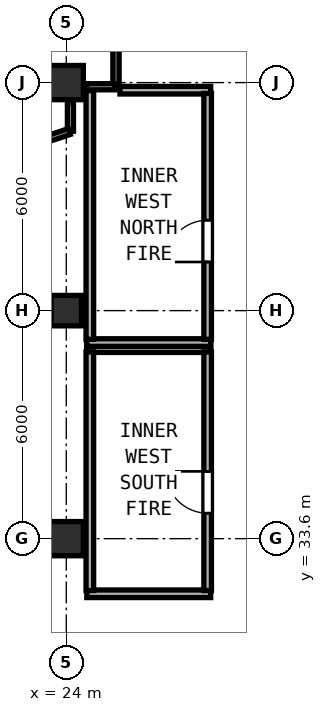
"""IFC4 building model, lengths in metres.
Left out: names, types, materials, properties, quantities, classifications, styles, units other than length and angle.
Written with IfcOpenShell. Run it as: python <this file> out.ifc"""

import sys

from ifc_helpers import new_model, si_unit, direction, frame, frame_2d, origin, origin_2d, place, context, subcontext, project, spatial, rectangle, hollow_rectangle, extrude, element, fill, save


model = new_model("IFC4")
c1 = context("Model", 3, precision=1e-05, world=origin(), true_north=direction((0.0, 1.0)))
c2 = subcontext(c1, "Body", "Model", "MODEL_VIEW")
j1 = project(units=[si_unit("LENGTHUNIT", "METRE"), si_unit("PLANEANGLEUNIT", "RADIAN")], contexts=[c1])
p1 = place(None, origin())
s1 = spatial("IfcSite", under=j1, at=p1, CompositionType="ELEMENT")
p2 = place(p1, origin())
s2 = spatial("IfcBuilding", under=s1, at=p2, CompositionType="ELEMENT")
p3 = place(p2, frame((0.0, 0.0, 207.0)))
s3 = spatial("IfcBuildingStorey", under=s2, at=p3, CompositionType="ELEMENT", Elevation=207.0)
for number, where, z_axis, x_axis in (
    (1, (24.0, 33.6, 0.0), (0.0, 0.0, 1.0), (1.0, 0.0, 0.0)),
    (2, (24.0, 45.6, 0.0), (0.0, 0.0, 1.0), (1.0, 0.0, 0.0)),
):
    element("IfcColumn", number, at=place(p3, frame(where, z_axis=z_axis, x_axis=x_axis)), inside=s3, PredefinedType="COLUMN", context=c2, shape_type="SweptSolid", body=[
        extrude(hollow_rectangle(XDim=0.9, YDim=0.9, WallThickness=0.034, at=origin_2d()), origin(), (0.0, 0.0, 1.0), 4.6),
    ])
p4 = place(p3, frame((24.0, 39.6, 0.0), z_axis=(0.0, 0.0, 1.0), x_axis=(1.0, 0.0, 0.0)))
e3 = element("IfcColumn", 3, at=p4, inside=s3, PredefinedType="COLUMN", context=c2, shape_type="SweptSolid", body=[
    extrude(hollow_rectangle(XDim=0.8, YDim=0.8, WallThickness=0.03, at=origin_2d()), origin(), (0.0, 0.0, 1.0), 4.6),
])
p5 = place(p3, frame((25.31, 46.66, 0.0), z_axis=(0.0, 0.0, 1.0), x_axis=(0.0, -1.0, 0.0)))
e4 = element("IfcWall", 4, at=p5, inside=s3, PredefinedType="PARAPET", context=c2, shape_type="SweptSolid", body=[
    extrude(rectangle(XDim=1.17, YDim=0.16, at=frame_2d((0.585, 0.0))), origin(), (0.0, 0.0, 1.0), 1.15),
])
p6 = place(p3, frame((25.28, 45.49, 0.0), z_axis=(0.0, 0.0, 1.0), x_axis=(-1.0, 0.0, 0.0)))
e5 = element("IfcWall", 5, at=p6, inside=s3, PredefinedType="PARAPET", context=c2, shape_type="SweptSolid", body=[
    extrude(rectangle(XDim=0.838, YDim=0.16, at=frame_2d((0.419, 0.0))), origin(), (0.0, 0.0, 1.0), 1.15),
])
p7 = place(p3, frame((24.11, 45.158, 0.0), z_axis=(0.0, 0.0, 1.0), x_axis=(0.0, -1.0, 0.0)))
e6 = element("IfcWall", 6, at=p7, inside=s3, PredefinedType="PARAPET", context=c2, shape_type="SweptSolid", body=[
    extrude(rectangle(XDim=0.837, YDim=0.16, at=frame_2d((0.418, 0.0))), origin(), (0.0, 0.0, 1.0), 1.15),
])
p8 = place(p3, frame((24.082, 44.311, 0.0), z_axis=(0.0, 0.0, 1.0), x_axis=(-0.948687320562, -0.316215698225, 0.0)))
e7 = element("IfcWall", 7, at=p8, inside=s3, PredefinedType="PARAPET", context=c2, shape_type="SweptSolid", body=[
    extrude(rectangle(XDim=6.069, YDim=0.16, at=frame_2d((3.035, 0.0))), origin(), (0.0, 0.0, 1.0), 1.15),
])
for number, where, z_axis, x_axis in (
    (8, (24.54, 38.6, 0.0), (0.0, 0.0, 1.0), (1.0, 0.0, 0.0)),
    (9, (24.54, 32.15, 0.0), (0.0, 0.0, 1.0), (1.0, 0.0, 0.0)),
):
    element("IfcWall", number, at=place(p3, frame(where, z_axis=z_axis, x_axis=x_axis)), inside=s3, PredefinedType="SOLIDWALL", context=c2, shape_type="SweptSolid", body=[
        extrude(rectangle(XDim=3.26, YDim=0.2, at=frame_2d((1.63, 0.0))), origin(), (0.0, 0.0, 1.0), 4.42),
    ])
p9 = place(p3, frame((24.62, 32.235, 0.0), z_axis=(0.0, 0.0, 1.0), x_axis=(0.0, 1.0, 0.0)))
e10 = element("IfcWall", 10, at=p9, inside=s3, PredefinedType="SOLIDWALL", context=c2, shape_type="SweptSolid", body=[
    extrude(rectangle(XDim=6.28, YDim=0.2, at=frame_2d((3.14, 0.0))), origin(), (0.0, 0.0, 1.0), 4.42),
])
p10 = place(p3, frame((27.72, 32.235, 0.0), z_axis=(0.0, 0.0, 1.0), x_axis=(0.0, 1.0, 0.0)))
e11 = element("IfcWall", 11, at=p10, inside=s3, PredefinedType="SOLIDWALL", context=c2, shape_type="SweptSolid", body=[
    extrude(rectangle(XDim=6.28, YDim=0.2, at=frame_2d((3.14, 0.0))), origin(), (0.0, 0.0, 1.0), 4.42),
])
p11 = place(p10, frame((3.135, 0.0, 0.0), z_axis=(0.0, 0.0, 1.0), x_axis=(-1.0, 0.0, 0.0)))
e12 = element("IfcOpeningElement", 12, at=p11, cuts=e11, PredefinedType="OPENING", context=c2, shape_type="SweptSolid", body=[
    extrude(rectangle(XDim=1.1, YDim=2.15, at=frame_2d((0.55, 1.075))), frame((0.0, 0.11, 0.0), z_axis=(0.0, -1.0, 0.0), x_axis=(1.0, 0.0, 0.0)), (0.0, 0.0, 1.0), 0.22),
])
p12 = place(p3, frame((25.412, 45.4, 0.0), z_axis=(0.0, 0.0, 1.0), x_axis=(1.0, 0.0, 0.0)))
e13 = element("IfcWall", 13, at=p12, inside=s3, PredefinedType="SOLIDWALL", context=c2, shape_type="SweptSolid", body=[
    extrude(rectangle(XDim=2.388, YDim=0.2, at=frame_2d((1.194, 0.0))), origin(), (0.0, 0.0, 1.0), 4.42),
])
p13 = place(p3, frame((24.54, 38.76, 0.0), z_axis=(0.0, 0.0, 1.0), x_axis=(1.0, 0.0, 0.0)))
e14 = element("IfcWall", 14, at=p13, inside=s3, PredefinedType="SOLIDWALL", context=c2, shape_type="SweptSolid", body=[
    extrude(rectangle(XDim=3.26, YDim=0.2, at=frame_2d((1.63, 0.0))), origin(), (0.0, 0.0, 1.0), 4.42),
])
p14 = place(p3, frame((24.62, 38.845, 0.0), z_axis=(0.0, 0.0, 1.0), x_axis=(0.0, 1.0, 0.0)))
e15 = element("IfcWall", 15, at=p14, inside=s3, PredefinedType="SOLIDWALL", context=c2, shape_type="SweptSolid", body=[
    extrude(rectangle(XDim=6.543, YDim=0.2, at=frame_2d((3.271, 0.0))), origin(), (0.0, 0.0, 1.0), 4.42),
])
p15 = place(p3, frame((27.72, 38.845, 0.0), z_axis=(0.0, 0.0, 1.0), x_axis=(0.0, 1.0, 0.0)))
e16 = element("IfcWall", 16, at=p15, inside=s3, PredefinedType="SOLIDWALL", context=c2, shape_type="SweptSolid", body=[
    extrude(rectangle(XDim=6.47, YDim=0.2, at=frame_2d((3.235, 0.0))), origin(), (0.0, 0.0, 1.0), 4.42),
])
p16 = place(p15, frame((3.135, 0.0, 0.0), z_axis=(0.0, 0.0, 1.0), x_axis=(-1.0, 0.0, 0.0)))
e17 = element("IfcOpeningElement", 17, at=p16, cuts=e16, PredefinedType="OPENING", context=c2, shape_type="SweptSolid", body=[
    extrude(rectangle(XDim=1.1, YDim=2.15, at=frame_2d((0.55, 1.075))), frame((0.0, 0.11, 0.0), z_axis=(0.0, -1.0, 0.0), x_axis=(1.0, 0.0, 0.0)), (0.0, 0.0, 1.0), 0.22),
])
p17 = place(p11, origin())
e18 = element("IfcDoor", 18, at=p17, inside=s3, OperationType="SINGLE_SWING_LEFT", PredefinedType="DOOR", context=c2, shape_type="SweptSolid", body=[
    extrude(rectangle(XDim=1.1, YDim=2.15, at=frame_2d((0.55, 1.075))), frame((0.0, 0.025, 0.0), z_axis=(0.0, -1.0, 0.0), x_axis=(1.0, 0.0, 0.0)), (0.0, 0.0, 1.0), 0.05),
])
fill(e12, e18)
p18 = place(p16, origin())
e19 = element("IfcDoor", 19, at=p18, inside=s3, OperationType="SINGLE_SWING_RIGHT", PredefinedType="DOOR", context=c2, shape_type="SweptSolid", body=[
    extrude(rectangle(XDim=1.1, YDim=2.15, at=frame_2d((0.55, 1.075))), frame((0.0, 0.025, 0.0), z_axis=(0.0, -1.0, 0.0), x_axis=(1.0, 0.0, 0.0)), (0.0, 0.0, 1.0), 0.05),
])
fill(e17, e19)
save(model, sys.argv[1])
